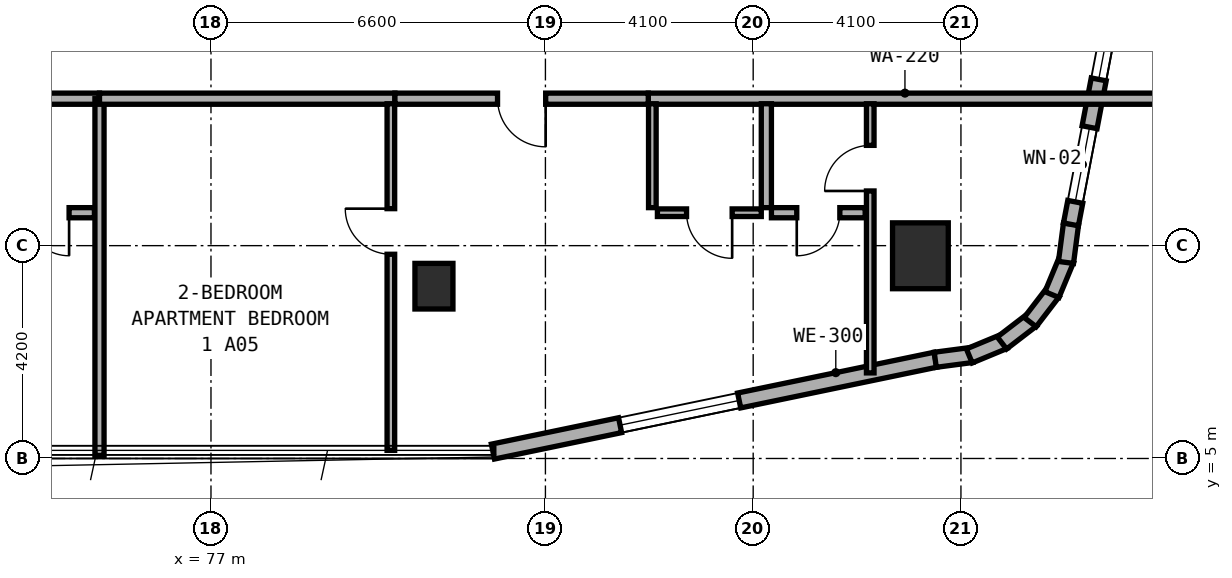
"""IFC4 building model, lengths in metres.
Left out: names, types, materials, properties, quantities, classifications, styles, units other than length and angle.
Written with IfcOpenShell. Run it as: python <this file> out.ifc"""

import sys

from ifc_helpers import new_model, si_unit, direction, frame, frame_2d, origin, origin_2d, place, context, subcontext, project, spatial, rectangle, extrude, element, fill, save


model = new_model("IFC4")
c1 = context("Model", 3, precision=1e-05, world=origin(), true_north=direction((0.0, 1.0)))
c2 = subcontext(c1, "Body", "Model", "MODEL_VIEW")
j1 = project(units=[si_unit("LENGTHUNIT", "METRE"), si_unit("PLANEANGLEUNIT", "RADIAN")], contexts=[c1])
p1 = place(None, origin())
s1 = spatial("IfcSite", under=j1, at=p1, CompositionType="ELEMENT")
p2 = place(p1, origin())
s2 = spatial("IfcBuilding", under=s1, at=p2, CompositionType="ELEMENT")
p3 = place(p2, frame((0.0, 0.0, 31.0)))
s3 = spatial("IfcBuildingStorey", under=s2, at=p3, CompositionType="ELEMENT", Elevation=31.0)
p4 = place(p3, frame((81.4, 8.4, 0.0), z_axis=(0.0, 0.0, 1.0), x_axis=(1.0, 0.0, 0.0)))
e1 = element("IfcColumn", 1, at=p4, inside=s3, PredefinedType="COLUMN", context=c2, shape_type="SweptSolid", body=[
    extrude(rectangle(XDim=0.75, YDim=0.9, at=origin_2d()), origin(), (0.0, 0.0, 1.0), 3.5),
])
p5 = place(p3, frame((91.0, 9.0, 0.0), z_axis=(0.0, 0.0, 1.0), x_axis=(1.0, 0.0, 0.0)))
e2 = element("IfcColumn", 2, at=p5, inside=s3, PredefinedType="COLUMN", context=c2, shape_type="SweptSolid", body=[
    extrude(rectangle(XDim=1.1, YDim=1.3, at=origin_2d()), origin(), (0.0, 0.0, 1.0), 3.5),
])
p6 = place(p3, frame((82.564, 5.136, 0.0), z_axis=(0.0, 0.0, 1.0), x_axis=(0.979128391325, 0.203242695569, 0.0)))
e3 = element("IfcWall", 3, at=p6, inside=s3, PredefinedType="STANDARD", context=c2, shape_type="SweptSolid", body=[
    extrude(rectangle(XDim=8.92, YDim=0.3, at=frame_2d((4.46, 0.0))), origin(), (0.0, 0.0, 1.0), 3.25),
])
p7 = place(p6, frame((2.563, 0.0, 0.8)))
e4 = element("IfcOpeningElement", 4, at=p7, cuts=e3, PredefinedType="OPENING", context=c2, shape_type="SweptSolid", body=[
    extrude(rectangle(XDim=2.4, YDim=1.6, at=frame_2d((1.2, 0.8))), frame((0.0, 0.16, 0.0), z_axis=(0.0, -1.0, 0.0), x_axis=(1.0, 0.0, 0.0)), (0.0, 0.0, 1.0), 0.32),
])
p8 = place(p3, frame((91.293, 6.948, 0.0), z_axis=(0.0, 0.0, 1.0), x_axis=(0.991486167159, 0.13021205909, 0.0)))
e5 = element("IfcWall", 5, at=p8, inside=s3, PredefinedType="STANDARD", context=c2, shape_type="SweptSolid", body=[
    extrude(rectangle(XDim=0.729, YDim=0.3, at=frame_2d((0.365, 0.0))), origin(), (0.0, 0.0, 1.0), 3.25),
])
for number, where, z_axis, x_axis in (
    (6, (91.965, 7.024, 0.0), (0.0, 0.0, 1.0), (0.924, 0.384, 0.0)),
    (7, (92.609, 7.279, 0.0), (0.0, 0.0, 1.0), (0.794, 0.608, 0.0)),
    (8, (93.166, 7.691, 0.0), (0.0, 0.0, 1.0), (0.609, 0.793, 0.0)),
):
    element("IfcWall", number, at=place(p3, frame(where, z_axis=z_axis, x_axis=x_axis)), inside=s3, PredefinedType="STANDARD", context=c2, shape_type="SweptSolid", body=[
        extrude(rectangle(XDim=0.746, YDim=0.3, at=frame_2d((0.373, 0.0))), origin(), (0.0, 0.0, 1.0), 3.25),
    ])
p9 = place(p3, frame((93.596, 8.234, 0.0), z_axis=(0.0, 0.0, 1.0), x_axis=(0.383430326427, 0.923569805037, 0.0)))
e9 = element("IfcWall", 9, at=p9, inside=s3, PredefinedType="STANDARD", context=c2, shape_type="SweptSolid", body=[
    extrude(rectangle(XDim=0.746, YDim=0.3, at=frame_2d((0.373, 0.0))), origin(), (0.0, 0.0, 1.0), 3.25),
])
p10 = place(p3, frame((93.873, 8.869, 0.0), z_axis=(0.0, 0.0, 1.0), x_axis=(0.129339184068, 0.991600411186, 0.0)))
e10 = element("IfcWall", 10, at=p10, inside=s3, PredefinedType="STANDARD", context=c2, shape_type="SweptSolid", body=[
    extrude(rectangle(XDim=0.764, YDim=0.3, at=frame_2d((0.382, 0.0))), origin(), (0.0, 0.0, 1.0), 3.25),
])
p11 = place(p3, frame((93.971, 9.62, 0.0), z_axis=(0.0, 0.0, 1.0), x_axis=(0.188087874316, 0.982152203854, 0.0)))
e11 = element("IfcWall", 11, at=p11, inside=s3, PredefinedType="STANDARD", context=c2, shape_type="SweptSolid", body=[
    extrude(rectangle(XDim=9.634, YDim=0.3, at=frame_2d((4.817, 0.0))), origin(), (0.0, 0.0, 1.0), 3.25),
])
p12 = place(p11, frame((0.452, 0.0, 0.85)))
e12 = element("IfcOpeningElement", 12, at=p12, cuts=e11, PredefinedType="OPENING", context=c2, shape_type="SweptSolid", body=[
    extrude(rectangle(XDim=1.5, YDim=1.5, at=frame_2d((0.75, 0.75))), frame((0.0, 0.16, 0.0), z_axis=(0.0, -1.0, 0.0), x_axis=(1.0, 0.0, 0.0)), (0.0, 0.0, 1.0), 0.32),
])
p13 = place(p11, frame((2.913, 0.0, 0.85)))
e13 = element("IfcOpeningElement", 13, at=p13, cuts=e11, PredefinedType="OPENING", context=c2, shape_type="SweptSolid", body=[
    extrude(rectangle(XDim=1.2, YDim=1.5, at=frame_2d((0.6, 0.75))), frame((0.0, 0.16, 0.0), z_axis=(0.0, -1.0, 0.0), x_axis=(1.0, 0.0, 0.0)), (0.0, 0.0, 1.0), 0.32),
])
p14 = place(p11, frame((5.928, 0.0, 0.8)))
e14 = element("IfcOpeningElement", 14, at=p14, cuts=e11, PredefinedType="OPENING", context=c2, shape_type="SweptSolid", body=[
    extrude(rectangle(XDim=2.4, YDim=1.6, at=frame_2d((1.2, 0.8))), frame((0.0, 0.16, 0.0), z_axis=(0.0, -1.0, 0.0), x_axis=(1.0, 0.0, 0.0)), (0.0, 0.0, 1.0), 0.32),
])
p15 = place(p3, frame((70.42, 12.1, 0.0), z_axis=(0.0, 0.0, 1.0), x_axis=(1.0, 0.0, 0.0)))
e15 = element("IfcWall", 15, at=p15, inside=s3, PredefinedType="SOLIDWALL", context=c2, shape_type="SweptSolid", body=[
    extrude(rectangle(XDim=4.38, YDim=0.22, at=frame_2d((2.19, 0.0))), origin(), (0.0, 0.0, 1.0), 2.725),
])
p16 = place(p3, frame((72.85, 9.85, 0.0), z_axis=(0.0, 0.0, 1.0), x_axis=(1.0, 0.0, 0.0)))
e16 = element("IfcWall", 16, at=p16, inside=s3, PredefinedType="PLUMBINGWALL", context=c2, shape_type="SweptSolid", body=[
    extrude(rectangle(XDim=1.85, YDim=0.2, at=frame_2d((0.925, 0.0))), origin(), (0.0, 0.0, 1.0), 3.22),
])
p17 = place(p16, frame((0.5, 0.0, 0.0)))
e17 = element("IfcOpeningElement", 17, at=p17, cuts=e16, PredefinedType="OPENING", context=c2, shape_type="SweptSolid", body=[
    extrude(rectangle(XDim=0.85, YDim=2.1, at=frame_2d((0.425, 1.05))), frame((0.0, 0.11, 0.0), z_axis=(0.0, -1.0, 0.0), x_axis=(1.0, 0.0, 0.0)), (0.0, 0.0, 1.0), 0.22),
])
p18 = place(p3, frame((74.8, 5.06, 0.0), z_axis=(0.0, 0.0, 1.0), x_axis=(0.0, 1.0, 0.0)))
e18 = element("IfcWall", 18, at=p18, inside=s3, PredefinedType="SOLIDWALL", context=c2, shape_type="SweptSolid", body=[
    extrude(rectangle(XDim=7.04, YDim=0.18, at=frame_2d((3.52, 0.0))), origin(), (0.0, 0.0, 1.0), 2.825),
])
p19 = place(p3, frame((74.8, 12.1, 0.0), z_axis=(0.0, 0.0, 1.0), x_axis=(1.0, 0.0, 0.0)))
e19 = element("IfcWall", 19, at=p19, inside=s3, PredefinedType="SOLIDWALL", context=c2, shape_type="SweptSolid", body=[
    extrude(rectangle(XDim=5.83, YDim=0.22, at=frame_2d((2.915, 0.0))), origin(), (0.0, 0.0, 1.0), 3.22),
])
p20 = place(p3, frame((85.63, 12.1, 0.0), z_axis=(0.0, 0.0, 1.0), x_axis=(1.0, 0.0, 0.0)))
e20 = element("IfcWall", 20, at=p20, inside=s3, PredefinedType="SOLIDWALL", context=c2, shape_type="SweptSolid", body=[
    extrude(rectangle(XDim=10.13, YDim=0.22, at=frame_2d((5.065, 0.0))), origin(), (0.0, 0.0, 1.0), 2.865),
])
p21 = place(p3, frame((80.63, 12.1, 0.0), z_axis=(0.0, 0.0, 1.0), x_axis=(1.0, 0.0, 0.0)))
e21 = element("IfcWall", 21, at=p21, inside=s3, PredefinedType="SOLIDWALL", context=c2, shape_type="SweptSolid", body=[
    extrude(rectangle(XDim=5.0, YDim=0.22, at=frame_2d((2.5, 0.0))), origin(), (0.0, 0.0, 1.0), 2.725),
])
p22 = place(p21, frame((2.025, 0.0, 0.0)))
e22 = element("IfcOpeningElement", 22, at=p22, cuts=e21, PredefinedType="OPENING", context=c2, shape_type="SweptSolid", body=[
    extrude(rectangle(XDim=0.95, YDim=2.1, at=frame_2d((0.475, 1.05))), frame((0.0, 0.12, 0.0), z_axis=(0.0, -1.0, 0.0), x_axis=(1.0, 0.0, 0.0)), (0.0, 0.0, 1.0), 0.24),
])
p23 = place(p3, frame((80.55, 5.16, 0.0), z_axis=(0.0, 0.0, 1.0), x_axis=(0.0, 1.0, 0.0)))
e23 = element("IfcWall", 23, at=p23, inside=s3, PredefinedType="PARTITIONING", context=c2, shape_type="SweptSolid", body=[
    extrude(rectangle(XDim=6.84, YDim=0.15, at=frame_2d((3.42, 0.0))), origin(), (0.0, 0.0, 1.0), 2.825),
])
p24 = place(p23, frame((3.87, 0.0, 0.0)))
e24 = element("IfcOpeningElement", 24, at=p24, cuts=e23, PredefinedType="OPENING", context=c2, shape_type="SweptSolid", body=[
    extrude(rectangle(XDim=0.9, YDim=2.1, at=frame_2d((0.45, 1.05))), frame((0.0, 0.085, 0.0), z_axis=(0.0, -1.0, 0.0), x_axis=(1.0, 0.0, 0.0)), (0.0, 0.0, 1.0), 0.17),
])
p25 = place(p3, frame((90.01, 6.689, 0.0), z_axis=(0.0, 0.0, 1.0), x_axis=(0.0, 1.0, 0.0)))
e25 = element("IfcWall", 25, at=p25, inside=s3, PredefinedType="PARTITIONING", context=c2, shape_type="SweptSolid", body=[
    extrude(rectangle(XDim=5.311, YDim=0.15, at=frame_2d((2.656, 0.0))), origin(), (0.0, 0.0, 1.0), 2.865),
])
p26 = place(p25, frame((3.59, 0.0, 0.0)))
e26 = element("IfcOpeningElement", 26, at=p26, cuts=e25, PredefinedType="OPENING", context=c2, shape_type="SweptSolid", body=[
    extrude(rectangle(XDim=0.9, YDim=2.1, at=frame_2d((0.45, 1.05))), frame((0.0, 0.085, 0.0), z_axis=(0.0, -1.0, 0.0), x_axis=(1.0, 0.0, 0.0)), (0.0, 0.0, 1.0), 0.17),
])
p27 = place(p3, frame((87.96, 9.95, 0.0), z_axis=(0.0, 0.0, 1.0), x_axis=(0.0, 1.0, 0.0)))
e27 = element("IfcWall", 27, at=p27, inside=s3, PredefinedType="PLUMBINGWALL", context=c2, shape_type="SweptSolid", body=[
    extrude(rectangle(XDim=2.05, YDim=0.2, at=frame_2d((1.025, 0.0))), origin(), (0.0, 0.0, 1.0), 3.22),
])
p28 = place(p3, frame((85.71, 9.95, 0.0), z_axis=(0.0, 0.0, 1.0), x_axis=(0.0, 1.0, 0.0)))
e28 = element("IfcWall", 28, at=p28, inside=s3, PredefinedType="PARTITIONING", context=c2, shape_type="SweptSolid", body=[
    extrude(rectangle(XDim=2.05, YDim=0.15, at=frame_2d((1.025, 0.0))), origin(), (0.0, 0.0, 1.0), 3.22),
])
p29 = place(p3, frame((88.06, 9.85, 0.0), z_axis=(0.0, 0.0, 1.0), x_axis=(1.0, 0.0, 0.0)))
e29 = element("IfcWall", 29, at=p29, inside=s3, PredefinedType="PLUMBINGWALL", context=c2, shape_type="SweptSolid", body=[
    extrude(rectangle(XDim=1.85, YDim=0.2, at=frame_2d((0.925, 0.0))), origin(), (0.0, 0.0, 1.0), 3.22),
])
p30 = place(p29, frame((0.5, 0.0, 0.0)))
e30 = element("IfcOpeningElement", 30, at=p30, cuts=e29, PredefinedType="OPENING", context=c2, shape_type="SweptSolid", body=[
    extrude(rectangle(XDim=0.85, YDim=2.1, at=frame_2d((0.425, 1.05))), frame((0.0, 0.11, 0.0), z_axis=(0.0, -1.0, 0.0), x_axis=(1.0, 0.0, 0.0)), (0.0, 0.0, 1.0), 0.22),
])
p31 = place(p3, frame((85.81, 9.85, 0.0), z_axis=(0.0, 0.0, 1.0), x_axis=(1.0, 0.0, 0.0)))
e31 = element("IfcWall", 31, at=p31, inside=s3, PredefinedType="PARTITIONING", context=c2, shape_type="SweptSolid", body=[
    extrude(rectangle(XDim=2.05, YDim=0.15, at=frame_2d((1.025, 0.0))), origin(), (0.0, 0.0, 1.0), 3.22),
])
p32 = place(p31, frame((0.575, 0.0, 0.0)))
e32 = element("IfcOpeningElement", 32, at=p32, cuts=e31, PredefinedType="OPENING", context=c2, shape_type="SweptSolid", body=[
    extrude(rectangle(XDim=0.9, YDim=2.1, at=frame_2d((0.45, 1.05))), frame((0.0, 0.085, 0.0), z_axis=(0.0, -1.0, 0.0), x_axis=(1.0, 0.0, 0.0)), (0.0, 0.0, 1.0), 0.17),
])
p33 = place(p7, origin())
e33 = element("IfcWindow", 33, at=p33, inside=s3, PartitioningType="SINGLE_PANEL", PredefinedType="WINDOW", context=c2, shape_type="SweptSolid", body=[
    extrude(rectangle(XDim=2.4, YDim=1.6, at=frame_2d((1.2, 0.8))), frame((0.0, 0.03, 0.0), z_axis=(0.0, -1.0, 0.0), x_axis=(1.0, 0.0, 0.0)), (0.0, 0.0, 1.0), 0.06),
])
fill(e4, e33)
p34 = place(p12, origin())
e34 = element("IfcWindow", 34, at=p34, inside=s3, PartitioningType="SINGLE_PANEL", PredefinedType="WINDOW", context=c2, shape_type="SweptSolid", body=[
    extrude(rectangle(XDim=1.5, YDim=1.5, at=frame_2d((0.75, 0.75))), frame((0.0, 0.03, 0.0), z_axis=(0.0, -1.0, 0.0), x_axis=(1.0, 0.0, 0.0)), (0.0, 0.0, 1.0), 0.06),
])
fill(e12, e34)
p35 = place(p13, origin())
e35 = element("IfcWindow", 35, at=p35, inside=s3, PartitioningType="SINGLE_PANEL", PredefinedType="WINDOW", context=c2, shape_type="SweptSolid", body=[
    extrude(rectangle(XDim=1.2, YDim=1.5, at=frame_2d((0.6, 0.75))), frame((0.0, 0.03, 0.0), z_axis=(0.0, -1.0, 0.0), x_axis=(1.0, 0.0, 0.0)), (0.0, 0.0, 1.0), 0.06),
])
fill(e13, e35)
p36 = place(p17, frame((0.85, 0.0, 0.0), z_axis=(0.0, 0.0, 1.0), x_axis=(-1.0, 0.0, 0.0)))
e36 = element("IfcDoor", 36, at=p36, inside=s3, OperationType="SINGLE_SWING_LEFT", PredefinedType="DOOR", context=c2, shape_type="SweptSolid", body=[
    extrude(rectangle(XDim=0.85, YDim=2.1, at=frame_2d((0.425, 1.05))), frame((0.0, 0.025, 0.0), z_axis=(0.0, -1.0, 0.0), x_axis=(1.0, 0.0, 0.0)), (0.0, 0.0, 1.0), 0.05),
])
fill(e17, e36)
p37 = place(p22, frame((0.95, 0.0, 0.0), z_axis=(0.0, 0.0, 1.0), x_axis=(-1.0, 0.0, 0.0)))
e37 = element("IfcDoor", 37, at=p37, inside=s3, OperationType="SINGLE_SWING_LEFT", PredefinedType="DOOR", context=c2, shape_type="SweptSolid", body=[
    extrude(rectangle(XDim=0.95, YDim=2.1, at=frame_2d((0.475, 1.05))), frame((0.0, 0.025, 0.0), z_axis=(0.0, -1.0, 0.0), x_axis=(1.0, 0.0, 0.0)), (0.0, 0.0, 1.0), 0.05),
])
fill(e22, e37)
p38 = place(p24, origin())
e38 = element("IfcDoor", 38, at=p38, inside=s3, OperationType="SINGLE_SWING_RIGHT", PredefinedType="DOOR", context=c2, shape_type="SweptSolid", body=[
    extrude(rectangle(XDim=0.9, YDim=2.1, at=frame_2d((0.45, 1.05))), frame((0.0, 0.025, 0.0), z_axis=(0.0, -1.0, 0.0), x_axis=(1.0, 0.0, 0.0)), (0.0, 0.0, 1.0), 0.05),
])
fill(e24, e38)
p39 = place(p26, origin())
e39 = element("IfcDoor", 39, at=p39, inside=s3, OperationType="SINGLE_SWING_LEFT", PredefinedType="DOOR", context=c2, shape_type="SweptSolid", body=[
    extrude(rectangle(XDim=0.9, YDim=2.1, at=frame_2d((0.45, 1.05))), frame((0.0, 0.025, 0.0), z_axis=(0.0, -1.0, 0.0), x_axis=(1.0, 0.0, 0.0)), (0.0, 0.0, 1.0), 0.05),
])
fill(e26, e39)
p40 = place(p30, frame((0.85, 0.0, 0.0), z_axis=(0.0, 0.0, 1.0), x_axis=(-1.0, 0.0, 0.0)))
e40 = element("IfcDoor", 40, at=p40, inside=s3, OperationType="SINGLE_SWING_RIGHT", PredefinedType="DOOR", context=c2, shape_type="SweptSolid", body=[
    extrude(rectangle(XDim=0.85, YDim=2.1, at=frame_2d((0.425, 1.05))), frame((0.0, 0.025, 0.0), z_axis=(0.0, -1.0, 0.0), x_axis=(1.0, 0.0, 0.0)), (0.0, 0.0, 1.0), 0.05),
])
fill(e30, e40)
p41 = place(p32, frame((0.9, 0.0, 0.0), z_axis=(0.0, 0.0, 1.0), x_axis=(-1.0, 0.0, 0.0)))
e41 = element("IfcDoor", 41, at=p41, inside=s3, OperationType="SINGLE_SWING_LEFT", PredefinedType="DOOR", context=c2, shape_type="SweptSolid", body=[
    extrude(rectangle(XDim=0.9, YDim=2.1, at=frame_2d((0.45, 1.05))), frame((0.0, 0.025, 0.0), z_axis=(0.0, -1.0, 0.0), x_axis=(1.0, 0.0, 0.0)), (0.0, 0.0, 1.0), 0.05),
])
fill(e32, e41)
save(model, sys.argv[1])
